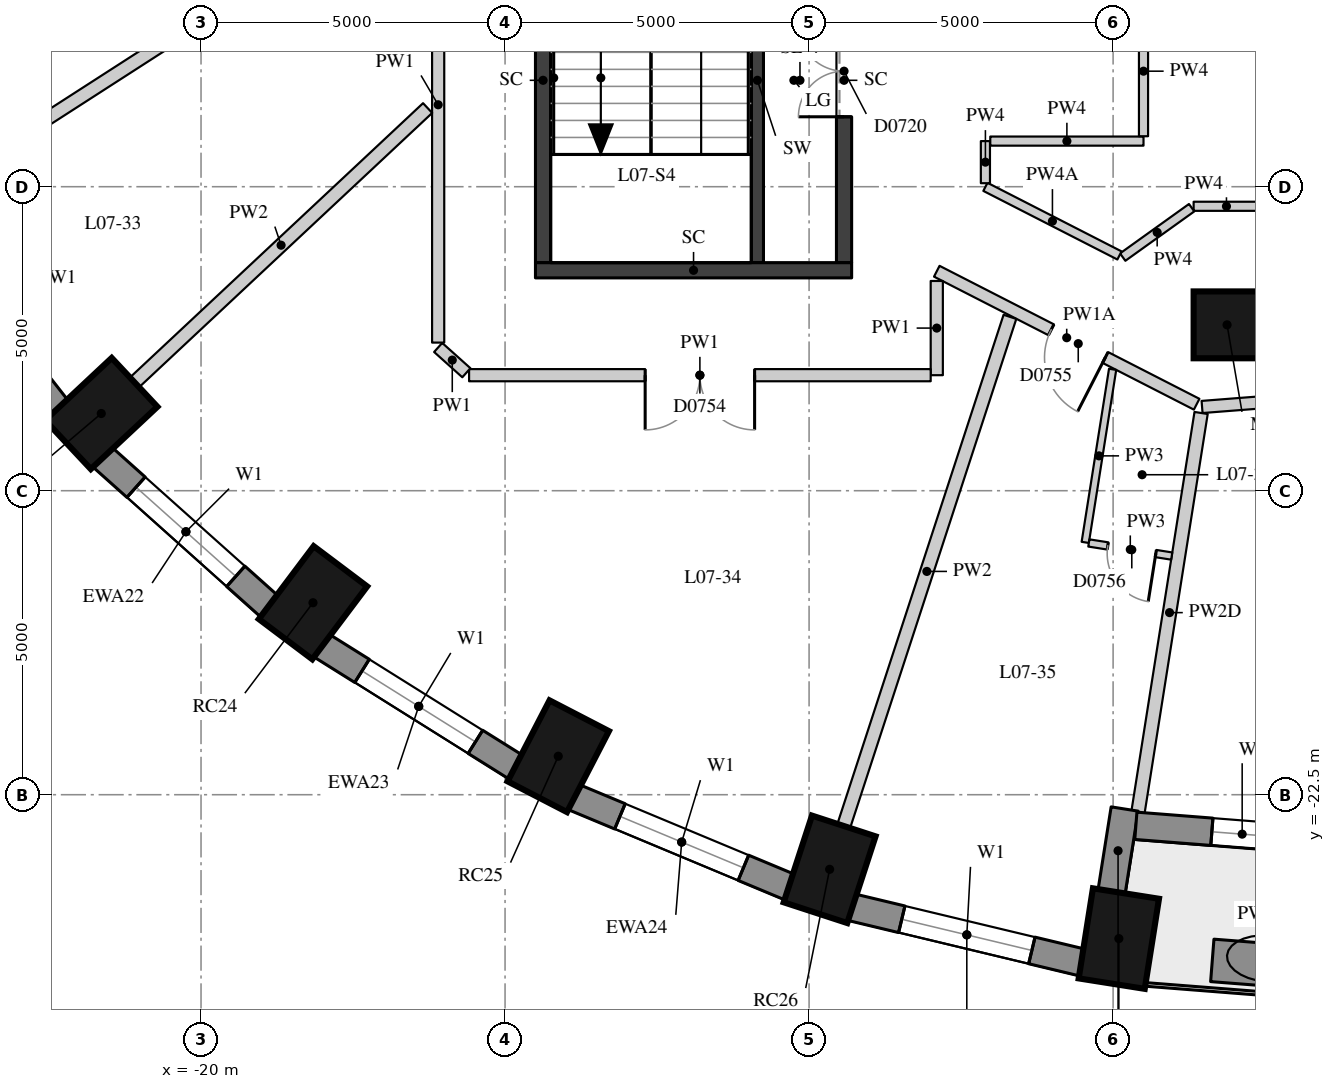
"""IFC4 building model, lengths in metres.
Left out: names, types, materials, properties, quantities, classifications, styles, units other than length and angle.
Written with IfcOpenShell. Run it as: python <this file> out.ifc"""

import sys

from ifc_helpers import new_model, si_unit, direction, frame, frame_2d, origin, origin_2d, place, context, subcontext, project, spatial, rectangle, extrude, element, fill, save


model = new_model("IFC4")
c1 = context("Model", 3, precision=1e-05, world=origin(), true_north=direction((0.0, 1.0)))
c2 = subcontext(c1, "Body", "Model", "MODEL_VIEW")
j1 = project(units=[si_unit("LENGTHUNIT", "METRE"), si_unit("PLANEANGLEUNIT", "RADIAN")], contexts=[c1])
p1 = place(None, origin())
s1 = spatial("IfcSite", under=j1, at=p1, CompositionType="ELEMENT")
p2 = place(p1, origin())
s2 = spatial("IfcBuilding", under=s1, at=p2, CompositionType="ELEMENT")
p3 = place(p2, frame((0.0, 0.0, 31.6)))
s3 = spatial("IfcBuildingStorey", under=s2, at=p3, CompositionType="ELEMENT", Elevation=31.6)
for number, where, z_axis, x_axis in (
    (1, (-21.641, -16.23, 0.0), (0.0, 0.0, 1.0), (-0.73, -0.683, 0.0)),
    (2, (-18.159, -19.343, 0.0), (0.0, 0.0, 1.0), (-0.601, -0.799, 0.0)),
    (3, (-14.125, -21.867, 0.0), (0.0, 0.0, 1.0), (-0.46, -0.888, 0.0)),
    (4, (-9.662, -23.727, 0.0), (0.0, 0.0, 1.0), (-0.31, -0.951, 0.0)),
    (5, (-4.906, -24.866, 0.0), (0.0, 0.0, 1.0), (-0.156, -0.988, 0.0)),
):
    element("IfcColumn", number, at=place(p3, frame(where, z_axis=z_axis, x_axis=x_axis)), inside=s3, PredefinedType="COLUMN", context=c2, shape_type="SweptSolid", body=[
        extrude(rectangle(XDim=1.5, YDim=1.1, at=origin_2d()), origin(), (0.0, 0.0, 1.0), 3.3),
    ])
p4 = place(p3, frame((-3.126, -14.772, 0.0), z_axis=(0.0, 0.0, 1.0), x_axis=(1.0, 0.0, 0.0)))
e6 = element("IfcColumn", 6, at=p4, inside=s3, PredefinedType="COLUMN", context=c2, shape_type="SweptSolid", body=[
    extrude(rectangle(XDim=1.1, YDim=1.1, at=origin_2d()), origin(), (0.0, 0.0, 1.0), 3.3),
])
p5 = place(p3, frame((-24.578, -13.328, 0.0), z_axis=(0.0, 0.0, 1.0), x_axis=(0.616661975264, -0.787228053529, 0.0)))
e7 = element("IfcWall", 7, at=p5, inside=s3, PredefinedType="SOLIDWALL", context=c2, shape_type="SweptSolid", body=[
    extrude(rectangle(XDim=3.61, YDim=0.45, at=frame_2d((1.805, 0.0))), origin(), (0.0, 0.0, 1.0), 3.02),
])
p6 = place(p5, frame((0.705, 0.0, 0.4)))
e8 = element("IfcOpeningElement", 8, at=p6, cuts=e7, PredefinedType="OPENING", context=c2, shape_type="SweptSolid", body=[
    extrude(rectangle(XDim=2.2, YDim=1.75, at=frame_2d((1.1, 0.875))), frame((0.0, 0.235, 0.0), z_axis=(0.0, -1.0, 0.0), x_axis=(1.0, 0.0, 0.0)), (0.0, 0.0, 1.0), 0.47),
])
p7 = place(p3, frame((-21.627, -16.943, 0.0), z_axis=(0.0, 0.0, 1.0), x_axis=(0.745526233716, -0.66647628228, 0.0)))
e9 = element("IfcWall", 9, at=p7, inside=s3, PredefinedType="SOLIDWALL", context=c2, shape_type="SweptSolid", body=[
    extrude(rectangle(XDim=3.697, YDim=0.45, at=frame_2d((1.848, 0.0))), origin(), (0.0, 0.0, 1.0), 3.02),
])
p8 = place(p7, frame((0.749, 0.0, 0.4)))
e10 = element("IfcOpeningElement", 10, at=p8, cuts=e9, PredefinedType="OPENING", context=c2, shape_type="SweptSolid", body=[
    extrude(rectangle(XDim=2.2, YDim=1.75, at=frame_2d((1.1, 0.875))), frame((0.0, 0.235, 0.0), z_axis=(0.0, -1.0, 0.0), x_axis=(1.0, 0.0, 0.0)), (0.0, 0.0, 1.0), 0.47),
])
p9 = place(p3, frame((-18.023, -20.044, 0.0), z_axis=(0.0, 0.0, 1.0), x_axis=(0.847635480093, -0.530579016629, 0.0)))
e11 = element("IfcWall", 11, at=p9, inside=s3, PredefinedType="SOLIDWALL", context=c2, shape_type="SweptSolid", body=[
    extrude(rectangle(XDim=3.782, YDim=0.45, at=frame_2d((1.891, 0.0))), origin(), (0.0, 0.0, 1.0), 3.02),
])
p10 = place(p9, frame((0.791, 0.0, 0.4)))
e12 = element("IfcOpeningElement", 12, at=p10, cuts=e11, PredefinedType="OPENING", context=c2, shape_type="SweptSolid", body=[
    extrude(rectangle(XDim=2.2, YDim=1.75, at=frame_2d((1.1, 0.875))), frame((0.0, 0.235, 0.0), z_axis=(0.0, -1.0, 0.0), x_axis=(1.0, 0.0, 0.0)), (0.0, 0.0, 1.0), 0.47),
])
p11 = place(p3, frame((-13.875, -22.537, 0.0), z_axis=(0.0, 0.0, 1.0), x_axis=(0.923031964282, -0.384723267966, 0.0)))
e13 = element("IfcWall", 13, at=p11, inside=s3, PredefinedType="SOLIDWALL", context=c2, shape_type="SweptSolid", body=[
    extrude(rectangle(XDim=3.856, YDim=0.45, at=frame_2d((1.928, 0.0))), origin(), (0.0, 0.0, 1.0), 3.02),
])
p12 = place(p11, frame((0.828, 0.0, 0.4)))
e14 = element("IfcOpeningElement", 14, at=p12, cuts=e13, PredefinedType="OPENING", context=c2, shape_type="SweptSolid", body=[
    extrude(rectangle(XDim=2.2, YDim=1.75, at=frame_2d((1.1, 0.875))), frame((0.0, 0.235, 0.0), z_axis=(0.0, -1.0, 0.0), x_axis=(1.0, 0.0, 0.0)), (0.0, 0.0, 1.0), 0.47),
])
p13 = place(p3, frame((-9.308, -24.35, 0.0), z_axis=(0.0, 0.0, 1.0), x_axis=(0.972496561493, -0.232917233979, 0.0)))
e15 = element("IfcWall", 15, at=p13, inside=s3, PredefinedType="SOLIDWALL", context=c2, shape_type="SweptSolid", body=[
    extrude(rectangle(XDim=3.911, YDim=0.45, at=frame_2d((1.956, 0.0))), origin(), (0.0, 0.0, 1.0), 3.02),
])
p14 = place(p13, frame((0.855, 0.0, 0.4)))
e16 = element("IfcOpeningElement", 16, at=p14, cuts=e15, PredefinedType="OPENING", context=c2, shape_type="SweptSolid", body=[
    extrude(rectangle(XDim=2.2, YDim=1.75, at=frame_2d((1.1, 0.875))), frame((0.0, 0.235, 0.0), z_axis=(0.0, -1.0, 0.0), x_axis=(1.0, 0.0, 0.0)), (0.0, 0.0, 1.0), 0.47),
])
p15 = place(p3, frame((-5.027, -24.108, 0.0), z_axis=(0.0, 0.0, 1.0), x_axis=(0.156133927791, 0.98773589415, 0.0)))
e17 = element("IfcWall", 17, at=p15, inside=s3, PredefinedType="SOLIDWALL", context=c2, shape_type="SweptSolid", body=[
    extrude(rectangle(XDim=1.39, YDim=0.45, at=frame_2d((0.695, 0.0))), origin(), (0.0, 0.0, 1.0), 2.47),
])
p16 = place(p3, frame((-4.626, -23.011, 0.0), z_axis=(0.0, 0.0, 1.0), x_axis=(0.996937095772, -0.078207589615, 0.0)))
e18 = element("IfcWall", 18, at=p16, inside=s3, PredefinedType="SOLIDWALL", context=c2, shape_type="SweptSolid", body=[
    extrude(rectangle(XDim=4.657, YDim=0.45, at=frame_2d((2.329, 0.0))), origin(), (0.0, 0.0, 1.0), 3.02),
])
p17 = place(p16, frame((1.254, 0.0, 0.4)))
e19 = element("IfcOpeningElement", 19, at=p17, cuts=e18, PredefinedType="OPENING", context=c2, shape_type="SweptSolid", body=[
    extrude(rectangle(XDim=1.0, YDim=1.75, at=frame_2d((0.5, 0.875))), frame((0.0, 0.235, 0.0), z_axis=(0.0, -1.0, 0.0), x_axis=(1.0, 0.0, 0.0)), (0.0, 0.0, 1.0), 0.47),
])
p18 = place(p16, frame((2.404, 0.0, 0.0)))
e20 = element("IfcOpeningElement", 20, at=p18, cuts=e18, PredefinedType="OPENING", context=c2, shape_type="SweptSolid", body=[
    extrude(rectangle(XDim=1.0, YDim=2.15, at=frame_2d((0.5, 1.075))), frame((0.0, 0.235, 0.0), z_axis=(0.0, -1.0, 0.0), x_axis=(1.0, 0.0, 0.0)), (0.0, 0.0, 1.0), 0.47),
])
p19 = place(p3, frame((-3.369, -25.225, 0.0), z_axis=(0.0, 0.0, 1.0), x_axis=(0.996965267018, -0.077847648384, 0.0)))
e21 = element("IfcWall", 21, at=p19, inside=s3, PredefinedType="USERDEFINED", context=c2, shape_type="SweptSolid", body=[
    extrude(rectangle(XDim=1.8, YDim=0.7, at=frame_2d((0.9, 0.0))), origin(), (0.0, 0.0, 1.0), 0.75),
])
p20 = place(p3, frame((-10.85, -13.75, 0.0), z_axis=(0.0, 0.0, 1.0), x_axis=(0.0, 1.0, 0.0)))
e22 = element("IfcWall", 22, at=p20, inside=s3, PredefinedType="SHEAR", context=c2, shape_type="SweptSolid", body=[
    extrude(rectangle(XDim=6.0, YDim=0.2, at=frame_2d((3.0, 0.0))), origin(), (0.0, 0.0, 1.0), 3.02),
])
p21 = place(p20, frame((4.4, 0.0, 0.0)))
e23 = element("IfcOpeningElement", 23, at=p21, cuts=e22, PredefinedType="OPENING", context=c2, shape_type="SweptSolid", body=[
    extrude(rectangle(XDim=1.5, YDim=2.1, at=frame_2d((0.75, 1.05))), frame((0.0, 0.11, 0.0), z_axis=(0.0, -1.0, 0.0), x_axis=(1.0, 0.0, 0.0)), (0.0, 0.0, 1.0), 0.22),
])
p22 = place(p3, frame((-14.375, -13.75, -0.28), z_axis=(0.0, 0.0, 1.0), x_axis=(0.0, 1.0, 0.0)))
e24 = element("IfcWall", 24, at=p22, inside=s3, PredefinedType="SHEAR", context=c2, shape_type="SweptSolid", body=[
    extrude(rectangle(XDim=6.0, YDim=0.25, at=frame_2d((3.0, 0.0))), origin(), (0.0, 0.0, 1.0), 3.3),
])
p23 = place(p3, frame((-9.425, -13.75, -0.28), z_axis=(0.0, 0.0, 1.0), x_axis=(0.0, 1.0, 0.0)))
e25 = element("IfcWall", 25, at=p23, inside=s3, PredefinedType="SHEAR", context=c2, shape_type="SweptSolid", body=[
    extrude(rectangle(XDim=6.0, YDim=0.25, at=frame_2d((3.0, 0.0))), origin(), (0.0, 0.0, 1.0), 3.3),
])
p24 = place(p23, frame((2.4, 0.0, 0.28)))
e26 = element("IfcOpeningElement", 26, at=p24, cuts=e25, PredefinedType="OPENING", context=c2, shape_type="SweptSolid", body=[
    extrude(rectangle(XDim=1.5, YDim=2.1, at=frame_2d((0.75, 1.05))), frame((0.0, 0.135, 0.0), z_axis=(0.0, -1.0, 0.0), x_axis=(1.0, 0.0, 0.0)), (0.0, 0.0, 1.0), 0.27),
])
p25 = place(p3, frame((-14.5, -13.875, -0.28), z_axis=(0.0, 0.0, 1.0), x_axis=(1.0, 0.0, 0.0)))
e27 = element("IfcWall", 27, at=p25, inside=s3, PredefinedType="SHEAR", context=c2, shape_type="SweptSolid", body=[
    extrude(rectangle(XDim=5.2, YDim=0.25, at=frame_2d((2.6, 0.0))), origin(), (0.0, 0.0, 1.0), 3.3),
])
p26 = place(p3, frame((6.84, -15.313, 0.0), z_axis=(0.0, 0.0, 1.0), x_axis=(-0.996968882229, -0.077801335898, 0.0)))
e28 = element("IfcWall", 28, at=p26, inside=s3, PredefinedType="PARTITIONING", context=c2, shape_type="SweptSolid", body=[
    extrude(rectangle(XDim=10.409, YDim=0.2, at=frame_2d((5.204, 0.0))), origin(), (0.0, 0.0, 1.0), 3.02),
])
p27 = place(p26, frame((5.773, 0.0, 0.0)))
e29 = element("IfcOpeningElement", 29, at=p27, cuts=e28, PredefinedType="OPENING", context=c2, shape_type="SweptSolid", body=[
    extrude(rectangle(XDim=1.1, YDim=2.1, at=frame_2d((0.55, 1.05))), frame((0.0, 0.11, 0.0), z_axis=(0.0, -1.0, 0.0), x_axis=(1.0, 0.0, 0.0)), (0.0, 0.0, 1.0), 0.22),
])
p28 = place(p26, frame((1.255, 0.0, 0.0)))
e30 = element("IfcOpeningElement", 30, at=p28, cuts=e28, PredefinedType="OPENING", context=c2, shape_type="SweptSolid", body=[
    extrude(rectangle(XDim=0.9, YDim=2.1, at=frame_2d((0.45, 1.05))), frame((0.0, 0.11, 0.0), z_axis=(0.0, -1.0, 0.0), x_axis=(1.0, 0.0, 0.0)), (0.0, 0.0, 1.0), 0.22),
])
p29 = place(p3, frame((-3.626, -16.078, 0.0), z_axis=(0.0, 0.0, 1.0), x_axis=(-0.890197807844, 0.455574212297, 0.0)))
e31 = element("IfcWall", 31, at=p29, inside=s3, PredefinedType="PARTITIONING", context=c2, shape_type="SweptSolid", body=[
    extrude(rectangle(XDim=4.801, YDim=0.2, at=frame_2d((2.4, 0.0))), origin(), (0.0, 0.0, 1.0), 2.57),
])
p30 = place(p29, frame((1.688, 0.0, 0.0)))
e32 = element("IfcOpeningElement", 32, at=p30, cuts=e31, PredefinedType="OPENING", context=c2, shape_type="SweptSolid", body=[
    extrude(rectangle(XDim=1.0, YDim=2.1, at=frame_2d((0.5, 1.05))), frame((0.0, 0.11, 0.0), z_axis=(0.0, -1.0, 0.0), x_axis=(1.0, 0.0, 0.0)), (0.0, 0.0, 1.0), 0.22),
])
p31 = place(p3, frame((-7.9, -14.051, 0.0), z_axis=(0.0, 0.0, 1.0), x_axis=(0.0, -1.0, 0.0)))
e33 = element("IfcWall", 33, at=p31, inside=s3, PredefinedType="PARTITIONING", context=c2, shape_type="SweptSolid", body=[
    extrude(rectangle(XDim=1.55, YDim=0.2, at=frame_2d((0.775, 0.0))), origin(), (0.0, 0.0, 1.0), 3.02),
])
p32 = place(p3, frame((-8.0, -15.6, 0.0), z_axis=(0.0, 0.0, 1.0), x_axis=(-1.0, 0.0, 0.0)))
e34 = element("IfcWall", 34, at=p32, inside=s3, PredefinedType="PARTITIONING", context=c2, shape_type="SweptSolid", body=[
    extrude(rectangle(XDim=7.592, YDim=0.2, at=frame_2d((3.796, 0.0))), origin(), (0.0, 0.0, 1.0), 3.02),
])
p33 = place(p32, frame((2.896, 0.0, 0.0)))
e35 = element("IfcOpeningElement", 35, at=p33, cuts=e34, PredefinedType="OPENING", context=c2, shape_type="SweptSolid", body=[
    extrude(rectangle(XDim=1.8, YDim=2.1, at=frame_2d((0.9, 1.05))), frame((0.0, 0.11, 0.0), z_axis=(0.0, -1.0, 0.0), x_axis=(1.0, 0.0, 0.0)), (0.0, 0.0, 1.0), 0.22),
])
p34 = place(p3, frame((-15.636, -15.56, 0.0), z_axis=(0.0, 0.0, 1.0), x_axis=(-0.744656758283, 0.667447610187, 0.0)))
e36 = element("IfcWall", 36, at=p34, inside=s3, PredefinedType="PARTITIONING", context=c2, shape_type="SweptSolid", body=[
    extrude(rectangle(XDim=0.623, YDim=0.2, at=frame_2d((0.312, 0.0))), origin(), (0.0, 0.0, 1.0), 3.02),
])
p35 = place(p3, frame((-16.1, -15.064, 0.0), z_axis=(0.0, 0.0, 1.0), x_axis=(0.0, 1.0, 0.0)))
e37 = element("IfcWall", 37, at=p35, inside=s3, PredefinedType="PARTITIONING", context=c2, shape_type="SweptSolid", body=[
    extrude(rectangle(XDim=7.823, YDim=0.2, at=frame_2d((3.912, 0.0))), origin(), (0.0, 0.0, 1.0), 3.02),
])
p36 = place(p35, frame((5.464, 0.0, 0.0)))
e38 = element("IfcOpeningElement", 38, at=p36, cuts=e37, PredefinedType="OPENING", context=c2, shape_type="SweptSolid", body=[
    extrude(rectangle(XDim=0.9, YDim=2.1, at=frame_2d((0.45, 1.05))), frame((0.0, 0.11, 0.0), z_axis=(0.0, -1.0, 0.0), x_axis=(1.0, 0.0, 0.0)), (0.0, 0.0, 1.0), 0.22),
])
p37 = place(p3, frame((-2.596, -12.822, 0.0), z_axis=(0.0, 0.0, 1.0), x_axis=(-1.0, 0.0, 0.0)))
e39 = element("IfcWall", 39, at=p37, inside=s3, PredefinedType="PARTITIONING", context=c2, shape_type="SweptSolid", body=[
    extrude(rectangle(XDim=1.08, YDim=0.15, at=frame_2d((0.54, 0.0))), origin(), (0.0, 0.0, 1.0), 3.02),
])
p38 = place(p3, frame((-3.708, -12.845, 0.0), z_axis=(0.0, 0.0, 1.0), x_axis=(-0.812857190658, -0.58246303539, 0.0)))
e40 = element("IfcWall", 40, at=p38, inside=s3, PredefinedType="PARTITIONING", context=c2, shape_type="SweptSolid", body=[
    extrude(rectangle(XDim=1.395, YDim=0.15, at=frame_2d((0.697, 0.0))), origin(), (0.0, 0.0, 1.0), 3.02),
])
p39 = place(p3, frame((-4.896, -13.631, 0.0), z_axis=(0.0, 0.0, 1.0), x_axis=(-0.890208185307, 0.455553934032, 0.0)))
e41 = element("IfcWall", 41, at=p39, inside=s3, PredefinedType="PARTITIONING", context=c2, shape_type="SweptSolid", body=[
    extrude(rectangle(XDim=2.477, YDim=0.15, at=frame_2d((1.238, 0.0))), origin(), (0.0, 0.0, 1.0), 2.57),
])
p40 = place(p3, frame((-7.1, -12.442, 0.0), z_axis=(0.0, 0.0, 1.0), x_axis=(0.0, 1.0, 0.0)))
e42 = element("IfcWall", 42, at=p40, inside=s3, PredefinedType="PARTITIONING", context=c2, shape_type="SweptSolid", body=[
    extrude(rectangle(XDim=0.692, YDim=0.15, at=frame_2d((0.346, 0.0))), origin(), (0.0, 0.0, 1.0), 3.02),
])
p41 = place(p3, frame((-7.02, -11.75, 0.0), z_axis=(0.0, 0.0, 1.0), x_axis=(1.0, 0.0, 0.0)))
e43 = element("IfcWall", 43, at=p41, inside=s3, PredefinedType="PARTITIONING", context=c2, shape_type="SweptSolid", body=[
    extrude(rectangle(XDim=2.52, YDim=0.15, at=frame_2d((1.26, 0.0))), origin(), (0.0, 0.0, 1.0), 3.02),
])
p42 = place(p3, frame((-4.5, -11.67, 0.0), z_axis=(0.0, 0.0, 1.0), x_axis=(0.0, 1.0, 0.0)))
e44 = element("IfcWall", 44, at=p42, inside=s3, PredefinedType="PARTITIONING", context=c2, shape_type="SweptSolid", body=[
    extrude(rectangle(XDim=2.14, YDim=0.15, at=frame_2d((1.07, 0.0))), origin(), (0.0, 0.0, 1.0), 3.02),
])
p43 = place(p3, frame((-23.835, -12.219, 0.0), z_axis=(0.0, 0.0, 1.0), x_axis=(0.840731477632, 0.541452290159, 0.0)))
e45 = element("IfcWall", 45, at=p43, inside=s3, PredefinedType="PARTITIONING", context=c2, shape_type="SweptSolid", body=[
    extrude(rectangle(XDim=9.021, YDim=0.22, at=frame_2d((4.51, 0.0))), origin(), (0.0, 0.0, 1.0), 3.02),
])
p44 = place(p3, frame((-21.093, -15.718, 0.0), z_axis=(0.0, 0.0, 1.0), x_axis=(0.73009284205, 0.683347965525, 0.0)))
e46 = element("IfcWall", 46, at=p44, inside=s3, PredefinedType="PARTITIONING", context=c2, shape_type="SweptSolid", body=[
    extrude(rectangle(XDim=6.602, YDim=0.22, at=frame_2d((3.301, 0.0))), origin(), (0.0, 0.0, 1.0), 3.02),
])
p45 = place(p3, frame((-9.429, -23.014, 0.0), z_axis=(0.0, 0.0, 1.0), x_axis=(0.310242805557, 0.950657352362, 0.0)))
e47 = element("IfcWall", 47, at=p45, inside=s3, PredefinedType="PARTITIONING", context=c2, shape_type="SweptSolid", body=[
    extrude(rectangle(XDim=8.808, YDim=0.22, at=frame_2d((4.404, 0.0))), origin(), (0.0, 0.0, 1.0), 3.02),
])
p46 = place(p3, frame((-4.591, -22.789, 0.0), z_axis=(0.0, 0.0, 1.0), x_axis=(0.156104000092, 0.987740624433, 0.0)))
e48 = element("IfcWall", 48, at=p46, inside=s3, PredefinedType="PARTITIONING", context=c2, shape_type="SweptSolid", body=[
    extrude(rectangle(XDim=6.648, YDim=0.22, at=frame_2d((3.324, 0.0))), origin(), (0.0, 0.0, 1.0), 2.47),
])
p47 = place(p3, frame((-5.008, -15.504, 0.0), z_axis=(0.0, 0.0, 1.0), x_axis=(-0.156219239615, -0.987722404917, 0.0)))
e49 = element("IfcWall", 49, at=p47, inside=s3, PredefinedType="PARTITIONING", context=c2, shape_type="SweptSolid", body=[
    extrude(rectangle(XDim=2.882, YDim=0.12, at=frame_2d((1.441, 0.0))), origin(), (0.0, 0.0, 1.0), 3.02),
])
p48 = place(p3, frame((-5.399, -18.359, 0.0), z_axis=(0.0, 0.0, 1.0), x_axis=(0.987722767831, -0.156216945011, 0.0)))
e50 = element("IfcWall", 50, at=p48, inside=s3, PredefinedType="PARTITIONING", context=c2, shape_type="SweptSolid", body=[
    extrude(rectangle(XDim=1.38, YDim=0.12, at=frame_2d((0.69, 0.0))), origin(), (0.0, 0.0, 1.0), 3.02),
])
p49 = place(p48, frame((0.315, 0.0, 0.0)))
e51 = element("IfcOpeningElement", 51, at=p49, cuts=e50, PredefinedType="OPENING", context=c2, shape_type="SweptSolid", body=[
    extrude(rectangle(XDim=0.8, YDim=2.1, at=frame_2d((0.4, 1.05))), frame((0.0, 0.07, 0.0), z_axis=(0.0, -1.0, 0.0), x_axis=(1.0, 0.0, 0.0)), (0.0, 0.0, 1.0), 0.14),
])
p50 = place(p8, origin())
e52 = element("IfcWindow", 52, at=p50, inside=s3, PartitioningType="SINGLE_PANEL", PredefinedType="WINDOW", context=c2, shape_type="SweptSolid", body=[
    extrude(rectangle(XDim=2.2, YDim=1.75, at=frame_2d((1.1, 0.875))), frame((0.0, 0.035, 0.0), z_axis=(0.0, -1.0, 0.0), x_axis=(1.0, 0.0, 0.0)), (0.0, 0.0, 1.0), 0.06),
])
fill(e10, e52)
p51 = place(p10, origin())
e53 = element("IfcWindow", 53, at=p51, inside=s3, PartitioningType="SINGLE_PANEL", PredefinedType="WINDOW", context=c2, shape_type="SweptSolid", body=[
    extrude(rectangle(XDim=2.2, YDim=1.75, at=frame_2d((1.1, 0.875))), frame((0.0, 0.035, 0.0), z_axis=(0.0, -1.0, 0.0), x_axis=(1.0, 0.0, 0.0)), (0.0, 0.0, 1.0), 0.06),
])
fill(e12, e53)
p52 = place(p12, origin())
e54 = element("IfcWindow", 54, at=p52, inside=s3, PartitioningType="SINGLE_PANEL", PredefinedType="WINDOW", context=c2, shape_type="SweptSolid", body=[
    extrude(rectangle(XDim=2.2, YDim=1.75, at=frame_2d((1.1, 0.875))), frame((0.0, 0.035, 0.0), z_axis=(0.0, -1.0, 0.0), x_axis=(1.0, 0.0, 0.0)), (0.0, 0.0, 1.0), 0.06),
])
fill(e14, e54)
p53 = place(p14, origin())
e55 = element("IfcWindow", 55, at=p53, inside=s3, PartitioningType="SINGLE_PANEL", PredefinedType="WINDOW", context=c2, shape_type="SweptSolid", body=[
    extrude(rectangle(XDim=2.2, YDim=1.75, at=frame_2d((1.1, 0.875))), frame((0.0, 0.035, 0.0), z_axis=(0.0, -1.0, 0.0), x_axis=(1.0, 0.0, 0.0)), (0.0, 0.0, 1.0), 0.06),
])
fill(e16, e55)
p54 = place(p17, origin())
e56 = element("IfcWindow", 56, at=p54, inside=s3, PartitioningType="SINGLE_PANEL", PredefinedType="WINDOW", context=c2, shape_type="SweptSolid", body=[
    extrude(rectangle(XDim=1.0, YDim=1.75, at=frame_2d((0.5, 0.875))), frame((0.0, 0.035, 0.0), z_axis=(0.0, -1.0, 0.0), x_axis=(1.0, 0.0, 0.0)), (0.0, 0.0, 1.0), 0.06),
])
fill(e19, e56)
p55 = place(p24, origin())
e57 = element("IfcDoor", 57, at=p55, inside=s3, OperationType="DOUBLE_DOOR_SINGLE_SWING", PredefinedType="DOOR", context=c2, shape_type="SweptSolid", body=[
    extrude(rectangle(XDim=1.5, YDim=2.1, at=frame_2d((0.75, 1.05))), frame((0.0, 0.025, 0.0), z_axis=(0.0, -1.0, 0.0), x_axis=(1.0, 0.0, 0.0)), (0.0, 0.0, 1.0), 0.05),
])
fill(e26, e57)
p56 = place(p33, origin())
e58 = element("IfcDoor", 58, at=p56, inside=s3, OperationType="DOUBLE_DOOR_SINGLE_SWING", PredefinedType="DOOR", context=c2, shape_type="SweptSolid", body=[
    extrude(rectangle(XDim=1.8, YDim=2.1, at=frame_2d((0.9, 1.05))), frame((0.0, 0.025, 0.0), z_axis=(0.0, -1.0, 0.0), x_axis=(1.0, 0.0, 0.0)), (0.0, 0.0, 1.0), 0.05),
])
fill(e35, e58)
p57 = place(p30, origin())
e59 = element("IfcDoor", 59, at=p57, inside=s3, OperationType="SINGLE_SWING_LEFT", PredefinedType="DOOR", context=c2, shape_type="SweptSolid", body=[
    extrude(rectangle(XDim=1.0, YDim=2.1, at=frame_2d((0.5, 1.05))), frame((0.0, 0.025, 0.0), z_axis=(0.0, -1.0, 0.0), x_axis=(1.0, 0.0, 0.0)), (0.0, 0.0, 1.0), 0.05),
])
fill(e32, e59)
p58 = place(p49, origin())
e60 = element("IfcDoor", 60, at=p58, inside=s3, OperationType="SINGLE_SWING_LEFT", PredefinedType="DOOR", context=c2, shape_type="SweptSolid", body=[
    extrude(rectangle(XDim=0.8, YDim=2.1, at=frame_2d((0.4, 1.05))), frame((0.0, 0.025, 0.0), z_axis=(0.0, -1.0, 0.0), x_axis=(1.0, 0.0, 0.0)), (0.0, 0.0, 1.0), 0.05),
])
fill(e51, e60)
save(model, sys.argv[1])
